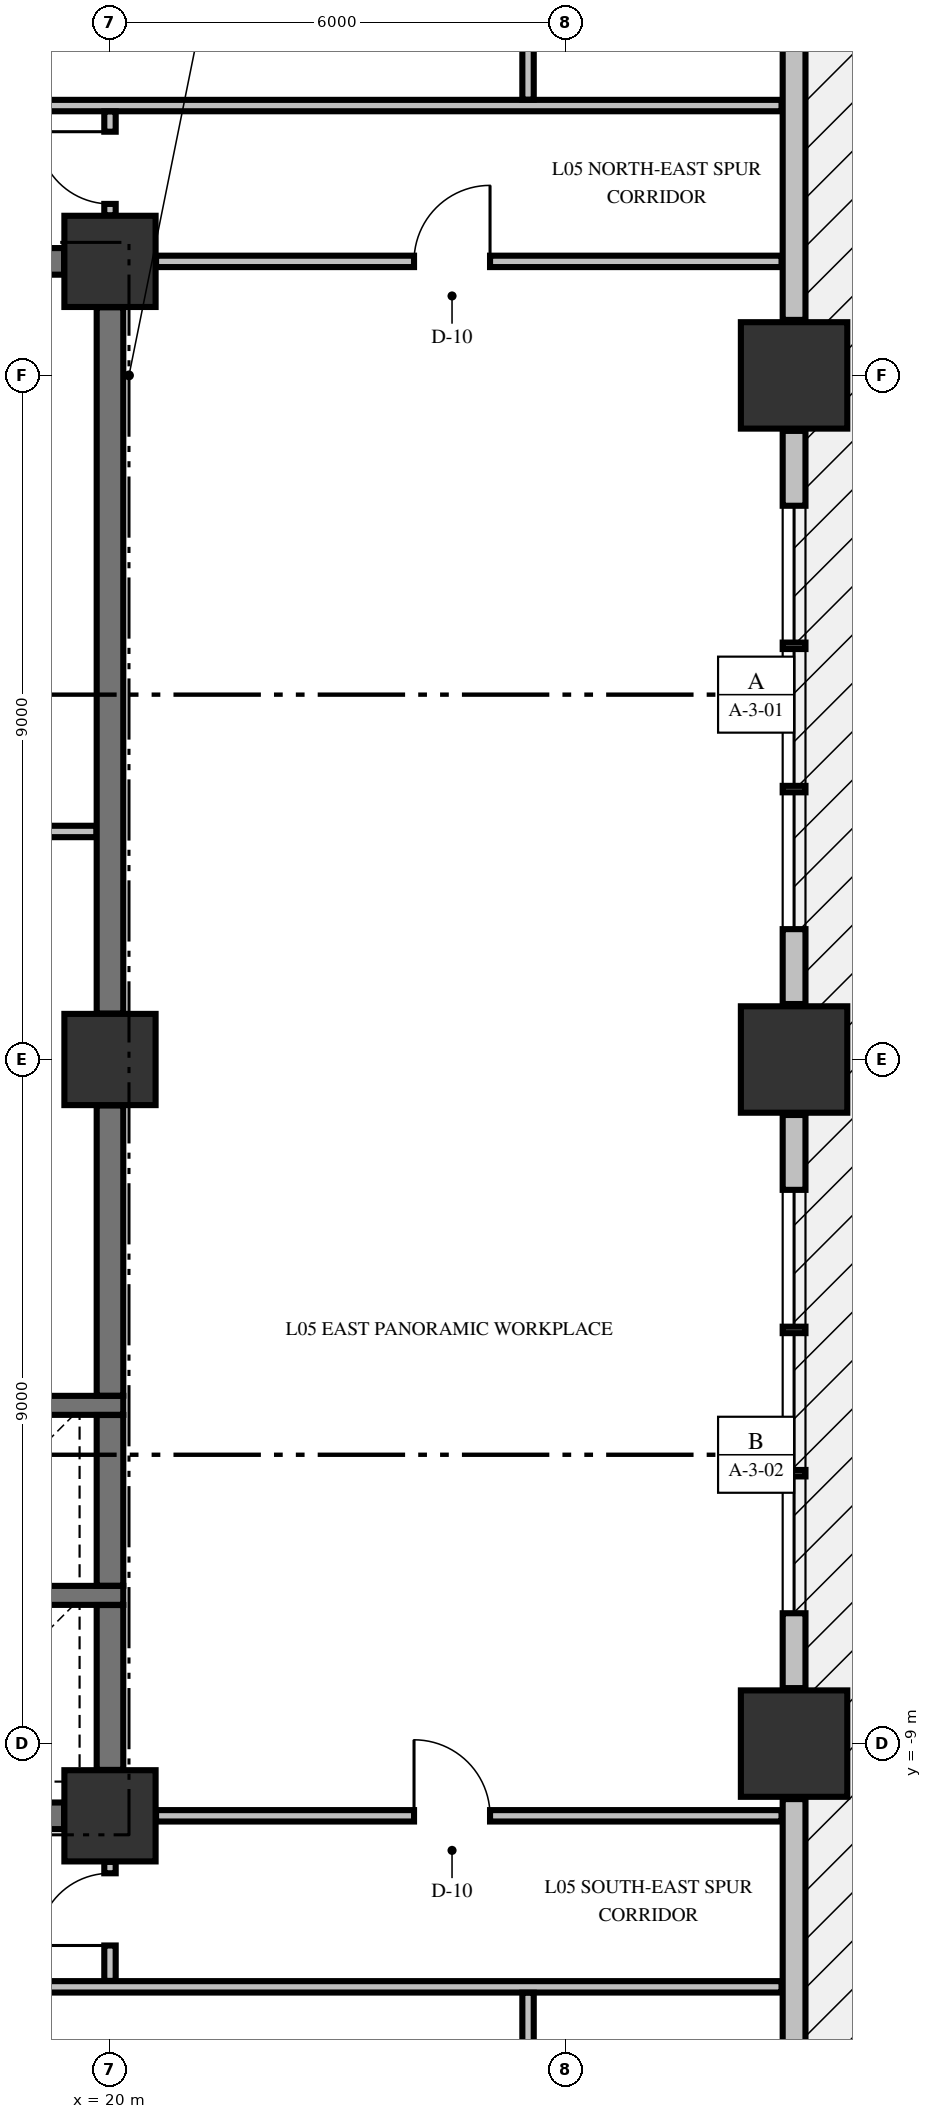
"""IFC4 building model, lengths in metres.
Left out: names, types, materials, properties, quantities, classifications, styles, units other than length and angle.
Written with IfcOpenShell. Run it as: python <this file> out.ifc"""

import sys

from ifc_helpers import new_model, si_unit, direction, frame, frame_2d, origin, origin_2d, place, context, subcontext, project, spatial, rectangle, extrude, element, fill, save


model = new_model("IFC4")
c1 = context("Model", 3, precision=1e-05, world=origin(), true_north=direction((0.0, 1.0)))
c2 = subcontext(c1, "Body", "Model", "MODEL_VIEW")
j1 = project(units=[si_unit("LENGTHUNIT", "METRE"), si_unit("PLANEANGLEUNIT", "RADIAN")], contexts=[c1])
p1 = place(None, origin())
s1 = spatial("IfcSite", under=j1, at=p1, CompositionType="ELEMENT")
p2 = place(p1, origin())
s2 = spatial("IfcBuilding", under=s1, at=p2, CompositionType="ELEMENT")
p3 = place(p2, frame((0.0, 0.0, 27.2)))
s3 = spatial("IfcBuildingStorey", under=s2, at=p3, CompositionType="ELEMENT", Elevation=27.2)
for number, where, z_axis, x_axis in (
    (1, (29.0, -9.0, -0.45), (0.0, 0.0, 1.0), (1.0, 0.0, 0.0)),
    (2, (29.0, 0.0, -0.45), (0.0, 0.0, 1.0), (1.0, 0.0, 0.0)),
    (3, (29.0, 9.0, -0.45), (0.0, 0.0, 1.0), (1.0, 0.0, 0.0)),
):
    element("IfcColumn", number, at=place(p3, frame(where, z_axis=z_axis, x_axis=x_axis)), inside=s3, PredefinedType="COLUMN", context=c2, shape_type="SweptSolid", body=[
        extrude(rectangle(XDim=1.4, YDim=1.4, at=origin_2d()), origin(), (0.0, 0.0, 1.0), 3.77),
    ])
for number, where, z_axis, x_axis in (
    (4, (20.0, -9.95, -0.45), (0.0, 0.0, 1.0), (1.0, 0.0, 0.0)),
    (5, (20.0, 10.5, -0.45), (0.0, 0.0, 1.0), (1.0, 0.0, 0.0)),
    (6, (20.0, 0.0, -0.45), (0.0, 0.0, 1.0), (1.0, 0.0, 0.0)),
):
    element("IfcColumn", number, at=place(p3, frame(where, z_axis=z_axis, x_axis=x_axis)), inside=s3, PredefinedType="COLUMN", context=c2, shape_type="SweptSolid", body=[
        extrude(rectangle(XDim=1.2, YDim=1.2, at=origin_2d()), origin(), (0.0, 0.0, 1.0), 3.77),
    ])
p4 = place(p3, frame((29.0, -22.27, 0.0), z_axis=(0.0, 0.0, 1.0), x_axis=(0.0, 1.0, 0.0)))
e7 = element("IfcWall", 7, at=p4, inside=s3, PredefinedType="STANDARD", context=c2, shape_type="SweptSolid", body=[
    extrude(rectangle(XDim=12.54, YDim=0.3, at=frame_2d((6.27, 0.0))), origin(), (0.0, 0.0, 1.0), 2.712),
])
p5 = place(p3, frame((29.0, -8.27, 0.0), z_axis=(0.0, 0.0, 1.0), x_axis=(0.0, 1.0, 0.0)))
e8 = element("IfcWall", 8, at=p5, inside=s3, PredefinedType="STANDARD", context=c2, shape_type="SweptSolid", body=[
    extrude(rectangle(XDim=7.54, YDim=0.3, at=frame_2d((3.77, 0.0))), origin(), (0.0, 0.0, 1.0), 2.712),
])
p6 = place(p5, frame((0.985, 0.0, 0.78)))
e9 = element("IfcOpeningElement", 9, at=p6, cuts=e8, PredefinedType="OPENING", context=c2, shape_type="SweptSolid", body=[
    extrude(rectangle(XDim=1.8, YDim=1.72, at=frame_2d((0.9, 0.86))), frame((0.0, 0.16, 0.0), z_axis=(0.0, -1.0, 0.0), x_axis=(1.0, 0.0, 0.0)), (0.0, 0.0, 1.0), 0.32),
])
p7 = place(p5, frame((2.87, 0.0, 0.78)))
e10 = element("IfcOpeningElement", 10, at=p7, cuts=e8, PredefinedType="OPENING", context=c2, shape_type="SweptSolid", body=[
    extrude(rectangle(XDim=1.8, YDim=1.72, at=frame_2d((0.9, 0.86))), frame((0.0, 0.16, 0.0), z_axis=(0.0, -1.0, 0.0), x_axis=(1.0, 0.0, 0.0)), (0.0, 0.0, 1.0), 0.32),
])
p8 = place(p5, frame((4.755, 0.0, 0.78)))
e11 = element("IfcOpeningElement", 11, at=p8, cuts=e8, PredefinedType="OPENING", context=c2, shape_type="SweptSolid", body=[
    extrude(rectangle(XDim=1.8, YDim=1.72, at=frame_2d((0.9, 0.86))), frame((0.0, 0.16, 0.0), z_axis=(0.0, -1.0, 0.0), x_axis=(1.0, 0.0, 0.0)), (0.0, 0.0, 1.0), 0.32),
])
p9 = place(p3, frame((29.0, 0.73, 0.0), z_axis=(0.0, 0.0, 1.0), x_axis=(0.0, 1.0, 0.0)))
e12 = element("IfcWall", 12, at=p9, inside=s3, PredefinedType="STANDARD", context=c2, shape_type="SweptSolid", body=[
    extrude(rectangle(XDim=7.54, YDim=0.3, at=frame_2d((3.77, 0.0))), origin(), (0.0, 0.0, 1.0), 2.712),
])
p10 = place(p9, frame((0.985, 0.0, 0.78)))
e13 = element("IfcOpeningElement", 13, at=p10, cuts=e12, PredefinedType="OPENING", context=c2, shape_type="SweptSolid", body=[
    extrude(rectangle(XDim=1.8, YDim=1.72, at=frame_2d((0.9, 0.86))), frame((0.0, 0.16, 0.0), z_axis=(0.0, -1.0, 0.0), x_axis=(1.0, 0.0, 0.0)), (0.0, 0.0, 1.0), 0.32),
])
p11 = place(p9, frame((2.87, 0.0, 0.78)))
e14 = element("IfcOpeningElement", 14, at=p11, cuts=e12, PredefinedType="OPENING", context=c2, shape_type="SweptSolid", body=[
    extrude(rectangle(XDim=1.8, YDim=1.72, at=frame_2d((0.9, 0.86))), frame((0.0, 0.16, 0.0), z_axis=(0.0, -1.0, 0.0), x_axis=(1.0, 0.0, 0.0)), (0.0, 0.0, 1.0), 0.32),
])
p12 = place(p9, frame((4.755, 0.0, 0.78)))
e15 = element("IfcOpeningElement", 15, at=p12, cuts=e12, PredefinedType="OPENING", context=c2, shape_type="SweptSolid", body=[
    extrude(rectangle(XDim=1.8, YDim=1.72, at=frame_2d((0.9, 0.86))), frame((0.0, 0.16, 0.0), z_axis=(0.0, -1.0, 0.0), x_axis=(1.0, 0.0, 0.0)), (0.0, 0.0, 1.0), 0.32),
])
p13 = place(p3, frame((29.0, 9.73, 0.0), z_axis=(0.0, 0.0, 1.0), x_axis=(0.0, 1.0, 0.0)))
e16 = element("IfcWall", 16, at=p13, inside=s3, PredefinedType="STANDARD", context=c2, shape_type="SweptSolid", body=[
    extrude(rectangle(XDim=12.54, YDim=0.3, at=frame_2d((6.27, 0.0))), origin(), (0.0, 0.0, 1.0), 2.712),
])
p14 = place(p3, frame((14.7, -9.95, 0.0), z_axis=(0.0, 0.0, 1.0), x_axis=(1.0, 0.0, 0.0)))
e17 = element("IfcWall", 17, at=p14, inside=s3, PredefinedType="SHEAR", context=c2, shape_type="SweptSolid", body=[
    extrude(rectangle(XDim=4.696, YDim=0.35, at=frame_2d((2.348, 0.0))), origin(), (0.0, 0.0, 1.0), 3.32),
])
p15 = place(p14, frame((0.8, 0.0, 0.0)))
e18 = element("IfcOpeningElement", 18, at=p15, cuts=e17, PredefinedType="OPENING", context=c2, shape_type="SweptSolid", body=[
    extrude(rectangle(XDim=0.9, YDim=2.15, at=frame_2d((0.45, 1.075))), frame((0.0, 0.185, 0.0), z_axis=(0.0, -1.0, 0.0), x_axis=(1.0, 0.0, 0.0)), (0.0, 0.0, 1.0), 0.37),
])
for number, where, z_axis, x_axis in (
    (19, (17.025, -7.05, 0.0), (0.0, 0.0, 1.0), (1.0, 0.0, 0.0)),
    (20, (17.025, -4.55, 0.0), (0.0, 0.0, 1.0), (1.0, 0.0, 0.0)),
):
    element("IfcWall", number, at=place(p3, frame(where, z_axis=z_axis, x_axis=x_axis)), inside=s3, PredefinedType="SOLIDWALL", context=c2, shape_type="SweptSolid", body=[
        extrude(rectangle(XDim=3.15, YDim=0.25, at=frame_2d((1.575, 0.0))), origin(), (0.0, 0.0, 1.0), 3.32),
    ])
p16 = place(p3, frame((14.7, 10.5, 0.0), z_axis=(0.0, 0.0, 1.0), x_axis=(1.0, 0.0, 0.0)))
e21 = element("IfcWall", 21, at=p16, inside=s3, PredefinedType="SHEAR", context=c2, shape_type="SweptSolid", body=[
    extrude(rectangle(XDim=4.696, YDim=0.35, at=frame_2d((2.348, 0.0))), origin(), (0.0, 0.0, 1.0), 3.32),
])
p17 = place(p16, frame((0.63, 0.0, 0.0)))
e22 = element("IfcOpeningElement", 22, at=p17, cuts=e21, PredefinedType="OPENING", context=c2, shape_type="SweptSolid", body=[
    extrude(rectangle(XDim=0.9, YDim=2.15, at=frame_2d((0.45, 1.075))), frame((0.0, 0.185, 0.0), z_axis=(0.0, -1.0, 0.0), x_axis=(1.0, 0.0, 0.0)), (0.0, 0.0, 1.0), 0.37),
])
p18 = place(p16, frame((3.27, 0.0, 0.0)))
e23 = element("IfcOpeningElement", 23, at=p18, cuts=e21, PredefinedType="OPENING", context=c2, shape_type="SweptSolid", body=[
    extrude(rectangle(XDim=0.9, YDim=2.15, at=frame_2d((0.45, 1.075))), frame((0.0, 0.185, 0.0), z_axis=(0.0, -1.0, 0.0), x_axis=(1.0, 0.0, 0.0)), (0.0, 0.0, 1.0), 0.37),
])
p19 = place(p3, frame((-23.835, -12.2, 0.0), z_axis=(0.0, 0.0, 1.0), x_axis=(1.0, 0.0, 0.0)))
e24 = element("IfcWall", 24, at=p19, inside=s3, PredefinedType="PARTITIONING", context=c2, shape_type="SweptSolid", body=[
    extrude(rectangle(XDim=52.67, YDim=0.15, at=frame_2d((26.335, 0.0))), origin(), (0.0, 0.0, 1.0), 3.32),
])
p20 = place(p19, frame((8.16, 0.0, 0.0)))
e25 = element("IfcOpeningElement", 25, at=p20, cuts=e24, PredefinedType="OPENING", context=c2, shape_type="SweptSolid", body=[
    extrude(rectangle(XDim=1.05, YDim=2.15, at=frame_2d((0.525, 1.075))), frame((0.0, 0.085, 0.0), z_axis=(0.0, -1.0, 0.0), x_axis=(1.0, 0.0, 0.0)), (0.0, 0.0, 1.0), 0.17),
])
p21 = place(p19, frame((18.31, 0.0, 0.0)))
e26 = element("IfcOpeningElement", 26, at=p21, cuts=e24, PredefinedType="OPENING", context=c2, shape_type="SweptSolid", body=[
    extrude(rectangle(XDim=1.05, YDim=2.15, at=frame_2d((0.525, 1.075))), frame((0.0, 0.085, 0.0), z_axis=(0.0, -1.0, 0.0), x_axis=(1.0, 0.0, 0.0)), (0.0, 0.0, 1.0), 0.17),
])
p22 = place(p19, frame((41.46, 0.0, 0.0)))
e27 = element("IfcOpeningElement", 27, at=p22, cuts=e24, PredefinedType="OPENING", context=c2, shape_type="SweptSolid", body=[
    extrude(rectangle(XDim=1.05, YDim=2.15, at=frame_2d((0.525, 1.075))), frame((0.0, 0.085, 0.0), z_axis=(0.0, -1.0, 0.0), x_axis=(1.0, 0.0, 0.0)), (0.0, 0.0, 1.0), 0.17),
])
p23 = place(p3, frame((20.606, -9.95, 0.0), z_axis=(0.0, 0.0, 1.0), x_axis=(1.0, 0.0, 0.0)))
e28 = element("IfcWall", 28, at=p23, inside=s3, PredefinedType="PARTITIONING", context=c2, shape_type="SweptSolid", body=[
    extrude(rectangle(XDim=8.229, YDim=0.15, at=frame_2d((4.115, 0.0))), origin(), (0.0, 0.0, 1.0), 3.32),
])
p24 = place(p23, frame((3.394, 0.0, 0.0)))
e29 = element("IfcOpeningElement", 29, at=p24, cuts=e28, PredefinedType="OPENING", context=c2, shape_type="SweptSolid", body=[
    extrude(rectangle(XDim=1.0, YDim=2.15, at=frame_2d((0.5, 1.075))), frame((0.0, 0.085, 0.0), z_axis=(0.0, -1.0, 0.0), x_axis=(1.0, 0.0, 0.0)), (0.0, 0.0, 1.0), 0.17),
])
p25 = place(p3, frame((16.775, 3.0, 0.0), z_axis=(0.0, 0.0, 1.0), x_axis=(1.0, 0.0, 0.0)))
e30 = element("IfcWall", 30, at=p25, inside=s3, PredefinedType="PARTITIONING", context=c2, shape_type="SweptSolid", body=[
    extrude(rectangle(XDim=3.047, YDim=0.15, at=frame_2d((1.523, 0.0))), origin(), (0.0, 0.0, 1.0), 3.32),
])
p26 = place(p25, frame((1.17, 0.0, 0.0)))
e31 = element("IfcOpeningElement", 31, at=p26, cuts=e30, PredefinedType="OPENING", context=c2, shape_type="SweptSolid", body=[
    extrude(rectangle(XDim=0.95, YDim=2.15, at=frame_2d((0.475, 1.075))), frame((0.0, 0.085, 0.0), z_axis=(0.0, -1.0, 0.0), x_axis=(1.0, 0.0, 0.0)), (0.0, 0.0, 1.0), 0.17),
])
p27 = place(p3, frame((20.606, 10.5, 0.0), z_axis=(0.0, 0.0, 1.0), x_axis=(1.0, 0.0, 0.0)))
e32 = element("IfcWall", 32, at=p27, inside=s3, PredefinedType="PARTITIONING", context=c2, shape_type="SweptSolid", body=[
    extrude(rectangle(XDim=8.229, YDim=0.15, at=frame_2d((4.115, 0.0))), origin(), (0.0, 0.0, 1.0), 3.32),
])
p28 = place(p27, frame((3.394, 0.0, 0.0)))
e33 = element("IfcOpeningElement", 33, at=p28, cuts=e32, PredefinedType="OPENING", context=c2, shape_type="SweptSolid", body=[
    extrude(rectangle(XDim=1.0, YDim=2.15, at=frame_2d((0.5, 1.075))), frame((0.0, 0.085, 0.0), z_axis=(0.0, -1.0, 0.0), x_axis=(1.0, 0.0, 0.0)), (0.0, 0.0, 1.0), 0.17),
])
p29 = place(p3, frame((-23.835, 12.55, 0.0), z_axis=(0.0, 0.0, 1.0), x_axis=(1.0, 0.0, 0.0)))
e34 = element("IfcWall", 34, at=p29, inside=s3, PredefinedType="PARTITIONING", context=c2, shape_type="SweptSolid", body=[
    extrude(rectangle(XDim=52.67, YDim=0.15, at=frame_2d((26.335, 0.0))), origin(), (0.0, 0.0, 1.0), 3.32),
])
p30 = place(p29, frame((9.16, 0.0, 0.0)))
e35 = element("IfcOpeningElement", 35, at=p30, cuts=e34, PredefinedType="OPENING", context=c2, shape_type="SweptSolid", body=[
    extrude(rectangle(XDim=1.05, YDim=2.15, at=frame_2d((0.525, 1.075))), frame((0.0, 0.085, 0.0), z_axis=(0.0, -1.0, 0.0), x_axis=(1.0, 0.0, 0.0)), (0.0, 0.0, 1.0), 0.17),
])
p31 = place(p29, frame((21.61, 0.0, 0.0)))
e36 = element("IfcOpeningElement", 36, at=p31, cuts=e34, PredefinedType="OPENING", context=c2, shape_type="SweptSolid", body=[
    extrude(rectangle(XDim=1.05, YDim=2.15, at=frame_2d((0.525, 1.075))), frame((0.0, 0.085, 0.0), z_axis=(0.0, -1.0, 0.0), x_axis=(1.0, 0.0, 0.0)), (0.0, 0.0, 1.0), 0.17),
])
p32 = place(p29, frame((30.06, 0.0, 0.0)))
e37 = element("IfcOpeningElement", 37, at=p32, cuts=e34, PredefinedType="OPENING", context=c2, shape_type="SweptSolid", body=[
    extrude(rectangle(XDim=1.05, YDim=2.15, at=frame_2d((0.525, 1.075))), frame((0.0, 0.085, 0.0), z_axis=(0.0, -1.0, 0.0), x_axis=(1.0, 0.0, 0.0)), (0.0, 0.0, 1.0), 0.17),
])
p33 = place(p3, frame((20.0, -9.346, 0.0), z_axis=(0.0, 0.0, 1.0), x_axis=(0.0, 1.0, 0.0)))
e38 = element("IfcWall", 38, at=p33, inside=s3, PredefinedType="SHEAR", context=c2, shape_type="SweptSolid", body=[
    extrude(rectangle(XDim=2.169, YDim=0.35, at=frame_2d((1.084, 0.0))), origin(), (0.0, 0.0, 1.0), 3.32),
])
p34 = place(p3, frame((20.0, -6.923, 0.0), z_axis=(0.0, 0.0, 1.0), x_axis=(0.0, 1.0, 0.0)))
e39 = element("IfcWall", 39, at=p34, inside=s3, PredefinedType="SHEAR", context=c2, shape_type="SweptSolid", body=[
    extrude(rectangle(XDim=2.246, YDim=0.35, at=frame_2d((1.123, 0.0))), origin(), (0.0, 0.0, 1.0), 3.32),
])
p35 = place(p3, frame((20.0, -4.423, 0.0), z_axis=(0.0, 0.0, 1.0), x_axis=(0.0, 1.0, 0.0)))
e40 = element("IfcWall", 40, at=p35, inside=s3, PredefinedType="SHEAR", context=c2, shape_type="SweptSolid", body=[
    extrude(rectangle(XDim=3.819, YDim=0.35, at=frame_2d((1.91, 0.0))), origin(), (0.0, 0.0, 1.0), 3.32),
])
p36 = place(p3, frame((20.0, 0.604, 0.0), z_axis=(0.0, 0.0, 1.0), x_axis=(0.0, 1.0, 0.0)))
e41 = element("IfcWall", 41, at=p36, inside=s3, PredefinedType="SHEAR", context=c2, shape_type="SweptSolid", body=[
    extrude(rectangle(XDim=9.292, YDim=0.35, at=frame_2d((4.646, 0.0))), origin(), (0.0, 0.0, 1.0), 3.32),
])
p37 = place(p3, frame((20.0, -12.122, 0.0), z_axis=(0.0, 0.0, 1.0), x_axis=(0.0, 1.0, 0.0)))
e42 = element("IfcWall", 42, at=p37, inside=s3, PredefinedType="PARTITIONING", context=c2, shape_type="SweptSolid", body=[
    extrude(rectangle(XDim=1.566, YDim=0.15, at=frame_2d((0.783, 0.0))), origin(), (0.0, 0.0, 1.0), 2.66),
])
p38 = place(p37, frame((0.466, 0.0, 0.0)))
e43 = element("IfcOpeningElement", 43, at=p38, cuts=e42, PredefinedType="OPENING", context=c2, shape_type="SweptSolid", body=[
    extrude(rectangle(XDim=0.95, YDim=2.15, at=frame_2d((0.475, 1.075))), frame((0.0, 0.085, 0.0), z_axis=(0.0, -1.0, 0.0), x_axis=(1.0, 0.0, 0.0)), (0.0, 0.0, 1.0), 0.17),
])
p39 = place(p3, frame((20.0, 11.106, 0.0), z_axis=(0.0, 0.0, 1.0), x_axis=(0.0, 1.0, 0.0)))
e44 = element("IfcWall", 44, at=p39, inside=s3, PredefinedType="PARTITIONING", context=c2, shape_type="SweptSolid", body=[
    extrude(rectangle(XDim=1.366, YDim=0.15, at=frame_2d((0.683, 0.0))), origin(), (0.0, 0.0, 1.0), 2.66),
])
p40 = place(p39, frame((0.15, 0.0, 0.0)))
e45 = element("IfcOpeningElement", 45, at=p40, cuts=e44, PredefinedType="OPENING", context=c2, shape_type="SweptSolid", body=[
    extrude(rectangle(XDim=0.95, YDim=2.15, at=frame_2d((0.475, 1.075))), frame((0.0, 0.085, 0.0), z_axis=(0.0, -1.0, 0.0), x_axis=(1.0, 0.0, 0.0)), (0.0, 0.0, 1.0), 0.17),
])
p41 = place(p3, frame((25.5, -22.294, 0.0), z_axis=(0.0, 0.0, 1.0), x_axis=(0.0, 1.0, 0.0)))
e46 = element("IfcWall", 46, at=p41, inside=s3, PredefinedType="PARTITIONING", context=c2, shape_type="SweptSolid", body=[
    extrude(rectangle(XDim=10.016, YDim=0.15, at=frame_2d((5.008, 0.0))), origin(), (0.0, 0.0, 1.0), 3.32),
])
p42 = place(p3, frame((25.5, 12.628, 0.0), z_axis=(0.0, 0.0, 1.0), x_axis=(0.0, 1.0, 0.0)))
e47 = element("IfcWall", 47, at=p42, inside=s3, PredefinedType="PARTITIONING", context=c2, shape_type="SweptSolid", body=[
    extrude(rectangle(XDim=9.666, YDim=0.15, at=frame_2d((4.833, 0.0))), origin(), (0.0, 0.0, 1.0), 3.32),
])
p43 = place(p6, origin())
e48 = element("IfcWindow", 48, at=p43, inside=s3, PartitioningType="SINGLE_PANEL", PredefinedType="WINDOW", context=c2, shape_type="SweptSolid", body=[
    extrude(rectangle(XDim=1.8, YDim=1.72, at=frame_2d((0.9, 0.86))), frame((0.0, 0.03, 0.0), z_axis=(0.0, -1.0, 0.0), x_axis=(1.0, 0.0, 0.0)), (0.0, 0.0, 1.0), 0.06),
])
fill(e9, e48)
p44 = place(p7, origin())
e49 = element("IfcWindow", 49, at=p44, inside=s3, PartitioningType="SINGLE_PANEL", PredefinedType="WINDOW", context=c2, shape_type="SweptSolid", body=[
    extrude(rectangle(XDim=1.8, YDim=1.72, at=frame_2d((0.9, 0.86))), frame((0.0, 0.03, 0.0), z_axis=(0.0, -1.0, 0.0), x_axis=(1.0, 0.0, 0.0)), (0.0, 0.0, 1.0), 0.06),
])
fill(e10, e49)
p45 = place(p8, origin())
e50 = element("IfcWindow", 50, at=p45, inside=s3, PartitioningType="SINGLE_PANEL", PredefinedType="WINDOW", context=c2, shape_type="SweptSolid", body=[
    extrude(rectangle(XDim=1.8, YDim=1.72, at=frame_2d((0.9, 0.86))), frame((0.0, 0.03, 0.0), z_axis=(0.0, -1.0, 0.0), x_axis=(1.0, 0.0, 0.0)), (0.0, 0.0, 1.0), 0.06),
])
fill(e11, e50)
p46 = place(p10, origin())
e51 = element("IfcWindow", 51, at=p46, inside=s3, PartitioningType="SINGLE_PANEL", PredefinedType="WINDOW", context=c2, shape_type="SweptSolid", body=[
    extrude(rectangle(XDim=1.8, YDim=1.72, at=frame_2d((0.9, 0.86))), frame((0.0, 0.03, 0.0), z_axis=(0.0, -1.0, 0.0), x_axis=(1.0, 0.0, 0.0)), (0.0, 0.0, 1.0), 0.06),
])
fill(e13, e51)
p47 = place(p11, origin())
e52 = element("IfcWindow", 52, at=p47, inside=s3, PartitioningType="SINGLE_PANEL", PredefinedType="WINDOW", context=c2, shape_type="SweptSolid", body=[
    extrude(rectangle(XDim=1.8, YDim=1.72, at=frame_2d((0.9, 0.86))), frame((0.0, 0.03, 0.0), z_axis=(0.0, -1.0, 0.0), x_axis=(1.0, 0.0, 0.0)), (0.0, 0.0, 1.0), 0.06),
])
fill(e14, e52)
p48 = place(p12, origin())
e53 = element("IfcWindow", 53, at=p48, inside=s3, PartitioningType="SINGLE_PANEL", PredefinedType="WINDOW", context=c2, shape_type="SweptSolid", body=[
    extrude(rectangle(XDim=1.8, YDim=1.72, at=frame_2d((0.9, 0.86))), frame((0.0, 0.03, 0.0), z_axis=(0.0, -1.0, 0.0), x_axis=(1.0, 0.0, 0.0)), (0.0, 0.0, 1.0), 0.06),
])
fill(e15, e53)
p49 = place(p40, origin())
e54 = element("IfcDoor", 54, at=p49, inside=s3, OperationType="SINGLE_SWING_RIGHT", PredefinedType="DOOR", context=c2, shape_type="SweptSolid", body=[
    extrude(rectangle(XDim=0.95, YDim=2.15, at=frame_2d((0.475, 1.075))), frame((0.0, 0.025, 0.0), z_axis=(0.0, -1.0, 0.0), x_axis=(1.0, 0.0, 0.0)), (0.0, 0.0, 1.0), 0.05),
])
fill(e45, e54)
p50 = place(p38, origin())
e55 = element("IfcDoor", 55, at=p50, inside=s3, OperationType="SINGLE_SWING_LEFT", PredefinedType="DOOR", context=c2, shape_type="SweptSolid", body=[
    extrude(rectangle(XDim=0.95, YDim=2.15, at=frame_2d((0.475, 1.075))), frame((0.0, 0.025, 0.0), z_axis=(0.0, -1.0, 0.0), x_axis=(1.0, 0.0, 0.0)), (0.0, 0.0, 1.0), 0.05),
])
fill(e43, e55)
p51 = place(p28, origin())
e56 = element("IfcDoor", 56, at=p51, inside=s3, OperationType="SINGLE_SWING_RIGHT", PredefinedType="DOOR", context=c2, shape_type="SweptSolid", body=[
    extrude(rectangle(XDim=1.0, YDim=2.15, at=frame_2d((0.5, 1.075))), frame((0.0, 0.025, 0.0), z_axis=(0.0, -1.0, 0.0), x_axis=(1.0, 0.0, 0.0)), (0.0, 0.0, 1.0), 0.05),
])
fill(e33, e56)
p52 = place(p24, origin())
e57 = element("IfcDoor", 57, at=p52, inside=s3, OperationType="SINGLE_SWING_LEFT", PredefinedType="DOOR", context=c2, shape_type="SweptSolid", body=[
    extrude(rectangle(XDim=1.0, YDim=2.15, at=frame_2d((0.5, 1.075))), frame((0.0, 0.025, 0.0), z_axis=(0.0, -1.0, 0.0), x_axis=(1.0, 0.0, 0.0)), (0.0, 0.0, 1.0), 0.05),
])
fill(e29, e57)
save(model, sys.argv[1])
